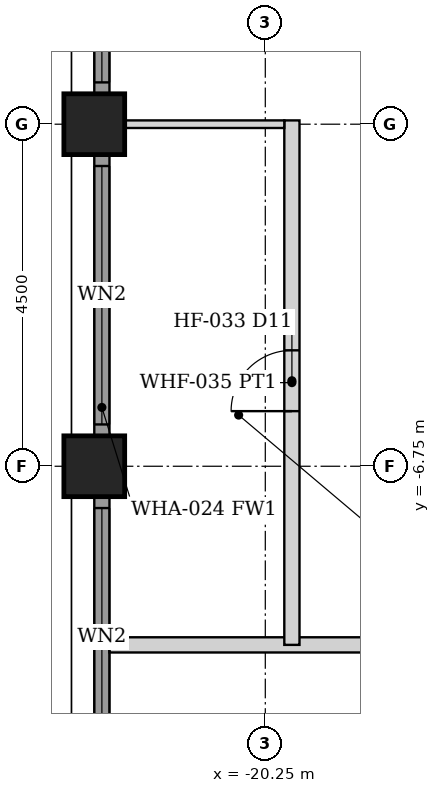
"""IFC4 building model, lengths in metres.
Left out: names, types, materials, properties, quantities, classifications, styles, units other than length and angle.
Written with IfcOpenShell. Run it as: python <this file> out.ifc"""

import sys

from ifc_helpers import new_model, si_unit, direction, frame, frame_2d, origin, origin_2d, place, context, subcontext, project, spatial, rectangle, hollow_rectangle, extrude, element, fill, save


model = new_model("IFC4")
c1 = context("Model", 3, precision=1e-05, world=origin(), true_north=direction((0.0, 1.0)))
c2 = subcontext(c1, "Body", "Model", "MODEL_VIEW")
j1 = project(units=[si_unit("LENGTHUNIT", "METRE"), si_unit("PLANEANGLEUNIT", "RADIAN")], contexts=[c1])
p1 = place(None, origin())
s1 = spatial("IfcSite", under=j1, at=p1, CompositionType="ELEMENT")
p2 = place(p1, origin())
s2 = spatial("IfcBuilding", under=s1, at=p2, CompositionType="ELEMENT")
p3 = place(p2, frame((0.0, 0.0, 172.4)))
s3 = spatial("IfcBuildingStorey", under=s2, at=p3, CompositionType="ELEMENT", Elevation=172.4)
for number, where, z_axis, x_axis in (
    (1, (-22.5, -6.75, 0.0), (0.0, 0.0, 1.0), (1.0, 0.0, 0.0)),
    (2, (-22.5, -2.25, 0.0), (0.0, 0.0, 1.0), (1.0, 0.0, 0.0)),
):
    element("IfcColumn", number, at=place(p3, frame(where, z_axis=z_axis, x_axis=x_axis)), inside=s3, PredefinedType="COLUMN", context=c2, shape_type="SweptSolid", body=[
        extrude(hollow_rectangle(XDim=0.8, YDim=0.8, WallThickness=0.045, at=origin_2d()), origin(), (0.0, 0.0, 1.0), 3.6),
    ])
p4 = place(p3, frame((-22.4, -10.845, 0.0), z_axis=(0.0, 0.0, 1.0), x_axis=(0.0, 1.0, 0.0)))
e3 = element("IfcWall", 3, at=p4, inside=s3, PredefinedType="SOLIDWALL", context=c2, shape_type="SweptSolid", body=[
    extrude(rectangle(XDim=3.69, YDim=0.2, at=frame_2d((1.845, 0.0))), origin(), (0.0, 0.0, 1.0), 2.479),
])
p5 = place(p4, frame((0.145, 0.0, 0.3)))
e4 = element("IfcOpeningElement", 4, at=p5, cuts=e3, PredefinedType="OPENING", context=c2, shape_type="SweptSolid", body=[
    extrude(rectangle(XDim=3.4, YDim=2.029, at=frame_2d((1.7, 1.015))), frame((0.0, 0.11, 0.0), z_axis=(0.0, -1.0, 0.0), x_axis=(1.0, 0.0, 0.0)), (0.0, 0.0, 1.0), 0.22),
])
p6 = place(p3, frame((-22.4, -6.345, 0.0), z_axis=(0.0, 0.0, 1.0), x_axis=(0.0, 1.0, 0.0)))
e5 = element("IfcWall", 5, at=p6, inside=s3, PredefinedType="SOLIDWALL", context=c2, shape_type="SweptSolid", body=[
    extrude(rectangle(XDim=3.69, YDim=0.2, at=frame_2d((1.845, 0.0))), origin(), (0.0, 0.0, 1.0), 2.479),
])
p7 = place(p6, frame((0.145, 0.0, 0.3)))
e6 = element("IfcOpeningElement", 6, at=p7, cuts=e5, PredefinedType="OPENING", context=c2, shape_type="SweptSolid", body=[
    extrude(rectangle(XDim=3.4, YDim=2.029, at=frame_2d((1.7, 1.015))), frame((0.0, 0.11, 0.0), z_axis=(0.0, -1.0, 0.0), x_axis=(1.0, 0.0, 0.0)), (0.0, 0.0, 1.0), 0.22),
])
p8 = place(p3, frame((-22.4, -1.845, 0.0), z_axis=(0.0, 0.0, 1.0), x_axis=(0.0, 1.0, 0.0)))
e7 = element("IfcWall", 7, at=p8, inside=s3, PredefinedType="SOLIDWALL", context=c2, shape_type="SweptSolid", body=[
    extrude(rectangle(XDim=3.69, YDim=0.2, at=frame_2d((1.845, 0.0))), origin(), (0.0, 0.0, 1.0), 2.479),
])
p9 = place(p8, frame((0.145, 0.0, 0.3)))
e8 = element("IfcOpeningElement", 8, at=p9, cuts=e7, PredefinedType="OPENING", context=c2, shape_type="SweptSolid", body=[
    extrude(rectangle(XDim=3.4, YDim=2.029, at=frame_2d((1.7, 1.015))), frame((0.0, 0.11, 0.0), z_axis=(0.0, -1.0, 0.0), x_axis=(1.0, 0.0, 0.0)), (0.0, 0.0, 1.0), 0.22),
])
p10 = place(p3, frame((-22.3, -9.1, 0.0), z_axis=(0.0, 0.0, 1.0), x_axis=(1.0, 0.0, 0.0)))
e9 = element("IfcWall", 9, at=p10, inside=s3, PredefinedType="PARTITIONING", context=c2, shape_type="SweptSolid", body=[
    extrude(rectangle(XDim=44.6, YDim=0.2, at=frame_2d((22.3, 0.0))), origin(), (0.0, 0.0, 1.0), 2.473),
])
p11 = place(p10, frame((6.75, 0.0, 0.0)))
e10 = element("IfcOpeningElement", 10, at=p11, cuts=e9, PredefinedType="OPENING", context=c2, shape_type="SweptSolid", body=[
    extrude(rectangle(XDim=0.9, YDim=2.1, at=frame_2d((0.45, 1.05))), frame((0.0, 0.11, 0.0), z_axis=(0.0, -1.0, 0.0), x_axis=(1.0, 0.0, 0.0)), (0.0, 0.0, 1.0), 0.22),
])
p12 = place(p10, frame((15.75, 0.0, 0.0)))
e11 = element("IfcOpeningElement", 11, at=p12, cuts=e9, PredefinedType="OPENING", context=c2, shape_type="SweptSolid", body=[
    extrude(rectangle(XDim=0.9, YDim=2.1, at=frame_2d((0.45, 1.05))), frame((0.0, 0.11, 0.0), z_axis=(0.0, -1.0, 0.0), x_axis=(1.0, 0.0, 0.0)), (0.0, 0.0, 1.0), 0.22),
])
p13 = place(p10, frame((32.45, 0.0, 0.0)))
e12 = element("IfcOpeningElement", 12, at=p13, cuts=e9, PredefinedType="OPENING", context=c2, shape_type="SweptSolid", body=[
    extrude(rectangle(XDim=0.9, YDim=2.1, at=frame_2d((0.45, 1.05))), frame((0.0, 0.11, 0.0), z_axis=(0.0, -1.0, 0.0), x_axis=(1.0, 0.0, 0.0)), (0.0, 0.0, 1.0), 0.22),
])
p14 = place(p10, frame((33.75, 0.0, 0.0)))
e13 = element("IfcOpeningElement", 13, at=p14, cuts=e9, PredefinedType="OPENING", context=c2, shape_type="SweptSolid", body=[
    extrude(rectangle(XDim=0.9, YDim=2.1, at=frame_2d((0.45, 1.05))), frame((0.0, 0.11, 0.0), z_axis=(0.0, -1.0, 0.0), x_axis=(1.0, 0.0, 0.0)), (0.0, 0.0, 1.0), 0.22),
])
p15 = place(p10, frame((38.85, 0.0, 0.0)))
e14 = element("IfcOpeningElement", 14, at=p15, cuts=e9, PredefinedType="OPENING", context=c2, shape_type="SweptSolid", body=[
    extrude(rectangle(XDim=0.9, YDim=2.1, at=frame_2d((0.45, 1.05))), frame((0.0, 0.11, 0.0), z_axis=(0.0, -1.0, 0.0), x_axis=(1.0, 0.0, 0.0)), (0.0, 0.0, 1.0), 0.22),
])
p16 = place(p10, frame((4.85, 0.0, 0.0)))
e15 = element("IfcOpeningElement", 15, at=p16, cuts=e9, PredefinedType="OPENING", context=c2, shape_type="SweptSolid", body=[
    extrude(rectangle(XDim=0.9, YDim=2.1, at=frame_2d((0.45, 1.05))), frame((0.0, 0.11, 0.0), z_axis=(0.0, -1.0, 0.0), x_axis=(1.0, 0.0, 0.0)), (0.0, 0.0, 1.0), 0.22),
])
p17 = place(p3, frame((-19.9, -9.1, 0.0), z_axis=(0.0, 0.0, 1.0), x_axis=(0.0, 1.0, 0.0)))
e16 = element("IfcWall", 16, at=p17, inside=s3, PredefinedType="PARTITIONING", context=c2, shape_type="SweptSolid", body=[
    extrude(rectangle(XDim=6.9, YDim=0.2, at=frame_2d((3.45, 0.0))), origin(), (0.0, 0.0, 1.0), 2.473),
])
p18 = place(p17, frame((3.075, 0.0, 0.0)))
e17 = element("IfcOpeningElement", 17, at=p18, cuts=e16, PredefinedType="OPENING", context=c2, shape_type="SweptSolid", body=[
    extrude(rectangle(XDim=0.8, YDim=2.1, at=frame_2d((0.4, 1.05))), frame((0.0, 0.11, 0.0), z_axis=(0.0, -1.0, 0.0), x_axis=(1.0, 0.0, 0.0)), (0.0, 0.0, 1.0), 0.22),
])
p19 = place(p3, frame((-22.1, -2.25, 0.0), z_axis=(0.0, 0.0, 1.0), x_axis=(1.0, 0.0, 0.0)))
e18 = element("IfcWall", 18, at=p19, inside=s3, PredefinedType="PARTITIONING", context=c2, shape_type="SweptSolid", body=[
    extrude(rectangle(XDim=2.1, YDim=0.1, at=frame_2d((1.05, 0.0))), origin(), (0.0, 0.0, 1.0), 2.473),
])
p20 = place(p5, origin())
e19 = element("IfcWindow", 19, at=p20, inside=s3, PartitioningType="SINGLE_PANEL", PredefinedType="WINDOW", context=c2, shape_type="SweptSolid", body=[
    extrude(rectangle(XDim=3.4, YDim=2.029, at=frame_2d((1.7, 1.015))), frame((0.0, 0.03, 0.0), z_axis=(0.0, -1.0, 0.0), x_axis=(1.0, 0.0, 0.0)), (0.0, 0.0, 1.0), 0.06),
])
fill(e4, e19)
p21 = place(p7, origin())
e20 = element("IfcWindow", 20, at=p21, inside=s3, PartitioningType="SINGLE_PANEL", PredefinedType="WINDOW", context=c2, shape_type="SweptSolid", body=[
    extrude(rectangle(XDim=3.4, YDim=2.029, at=frame_2d((1.7, 1.015))), frame((0.0, 0.03, 0.0), z_axis=(0.0, -1.0, 0.0), x_axis=(1.0, 0.0, 0.0)), (0.0, 0.0, 1.0), 0.06),
])
fill(e6, e20)
p22 = place(p9, origin())
e21 = element("IfcWindow", 21, at=p22, inside=s3, PartitioningType="SINGLE_PANEL", PredefinedType="WINDOW", context=c2, shape_type="SweptSolid", body=[
    extrude(rectangle(XDim=3.4, YDim=2.029, at=frame_2d((1.7, 1.015))), frame((0.0, 0.03, 0.0), z_axis=(0.0, -1.0, 0.0), x_axis=(1.0, 0.0, 0.0)), (0.0, 0.0, 1.0), 0.06),
])
fill(e8, e21)
p23 = place(p18, origin())
e22 = element("IfcDoor", 22, at=p23, inside=s3, OperationType="SINGLE_SWING_LEFT", PredefinedType="DOOR", context=c2, shape_type="SweptSolid", body=[
    extrude(rectangle(XDim=0.8, YDim=2.1, at=frame_2d((0.4, 1.05))), frame((0.0, 0.025, 0.0), z_axis=(0.0, -1.0, 0.0), x_axis=(1.0, 0.0, 0.0)), (0.0, 0.0, 1.0), 0.05),
])
fill(e17, e22)
save(model, sys.argv[1])
